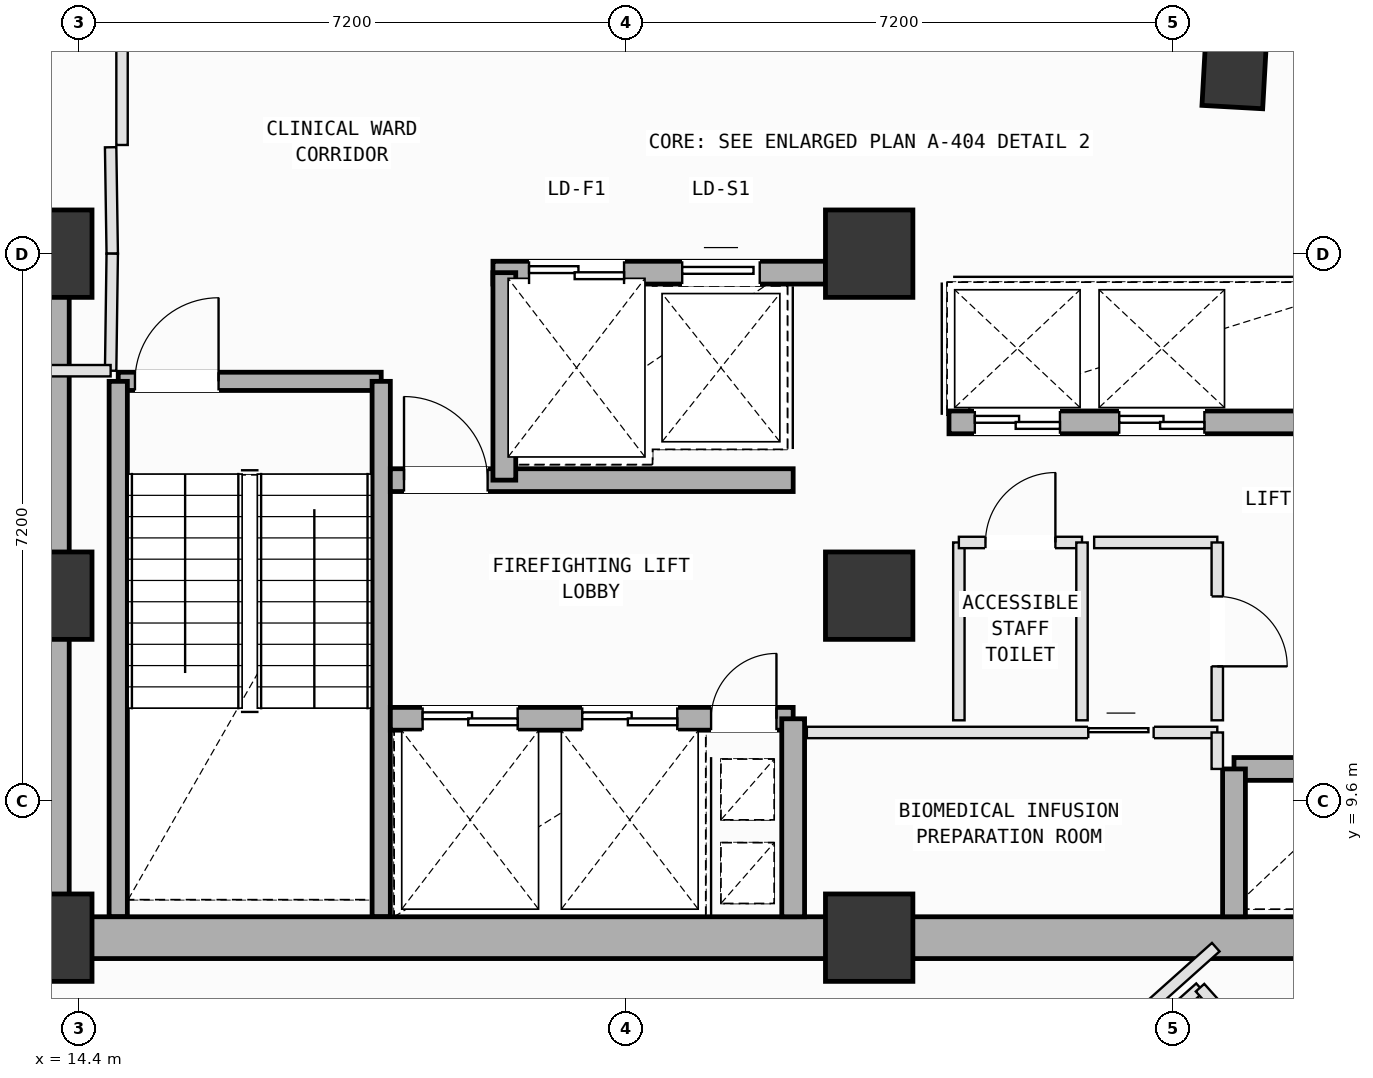
"""IFC4 building model, lengths in metres.
Left out: names, types, materials, properties, quantities, classifications, styles, units other than length and angle.
Written with IfcOpenShell. Run it as: python <this file> out.ifc"""

import sys

from ifc_helpers import new_model, si_unit, direction, frame, frame_2d, origin, origin_2d, place, context, subcontext, project, spatial, rectangle, extrude, element, fill, save


model = new_model("IFC4")
c1 = context("Model", 3, precision=1e-05, world=origin(), true_north=direction((0.0, 1.0)))
c2 = subcontext(c1, "Body", "Model", "MODEL_VIEW")
j1 = project(units=[si_unit("LENGTHUNIT", "METRE"), si_unit("PLANEANGLEUNIT", "RADIAN")], contexts=[c1])
p1 = place(None, origin())
s1 = spatial("IfcSite", under=j1, at=p1, CompositionType="ELEMENT")
p2 = place(p1, origin())
s2 = spatial("IfcBuilding", under=s1, at=p2, CompositionType="ELEMENT")
p3 = place(p2, frame((0.0, 0.0, 201.8)))
s3 = spatial("IfcBuildingStorey", under=s2, at=p3, CompositionType="ELEMENT", Elevation=201.8)
for number, where, z_axis, x_axis in (
    (1, (14.0, 7.8, 0.0), (0.0, 0.0, 1.0), (1.0, 0.0, 0.0)),
    (2, (14.0, 12.3, 0.0), (0.0, 0.0, 1.0), (1.0, 0.0, 0.0)),
    (3, (14.0, 16.8, 0.0), (0.0, 0.0, 1.0), (1.0, 0.0, 0.0)),
    (4, (24.8, 7.8, 0.0), (0.0, 0.0, 1.0), (1.0, 0.0, 0.0)),
    (5, (24.8, 12.3, 0.0), (0.0, 0.0, 1.0), (1.0, 0.0, 0.0)),
    (6, (24.8, 16.8, 0.0), (0.0, 0.0, 1.0), (1.0, 0.0, 0.0)),
):
    element("IfcColumn", number, at=place(p3, frame(where, z_axis=z_axis, x_axis=x_axis)), inside=s3, PredefinedType="COLUMN", context=c2, shape_type="SweptSolid", body=[
        extrude(rectangle(XDim=1.15, YDim=1.15, at=origin_2d()), origin(), (0.0, 0.0, 1.0), 4.0),
    ])
p4 = place(p3, frame((29.617, 19.428, 0.002), z_axis=(0.022404649065, -0.016327771648, 0.999615643922), x_axis=(-0.773714259991, 0.632929754663, 0.027679767862)))
e7 = element("IfcColumn", 7, at=p4, inside=s3, PredefinedType="COLUMN", context=c2, shape_type="SweptSolid", body=[
    extrude(rectangle(XDim=1.4, YDim=0.8, at=origin_2d()), origin(), (0.0, 0.0, 1.0), 3.977),
])
p5 = place(p3, frame((17.225, 1.931, 0.0), z_axis=(0.0, 0.0, 1.0), x_axis=(-0.666514603802, 0.745491973746, 0.0)))
e8 = element("IfcWall", 8, at=p5, inside=s3, PredefinedType="SOLIDWALL", context=c2, shape_type="SweptSolid", body=[
    extrude(rectangle(XDim=7.36, YDim=0.28, at=frame_2d((3.68, 0.0))), origin(), (0.0, 0.0, 1.0), 3.185),
])
p6 = place(p5, frame((2.881, 0.0, 0.75)))
e9 = element("IfcOpeningElement", 9, at=p6, cuts=e8, PredefinedType="OPENING", context=c2, shape_type="SweptSolid", body=[
    extrude(rectangle(XDim=1.6, YDim=1.95, at=frame_2d((0.8, 0.975))), frame((0.0, 0.15, 0.0), z_axis=(0.0, -1.0, 0.0), x_axis=(1.0, 0.0, 0.0)), (0.0, 0.0, 1.0), 0.3),
])
p7 = place(p5, frame((5.186, 0.0, 0.75)))
e10 = element("IfcOpeningElement", 10, at=p7, cuts=e8, PredefinedType="OPENING", context=c2, shape_type="SweptSolid", body=[
    extrude(rectangle(XDim=1.6, YDim=1.95, at=frame_2d((0.8, 0.975))), frame((0.0, 0.15, 0.0), z_axis=(0.0, -1.0, 0.0), x_axis=(1.0, 0.0, 0.0)), (0.0, 0.0, 1.0), 0.3),
])
p8 = place(p3, frame((14.92, 15.12, 0.0), z_axis=(0.0, 0.0, 1.0), x_axis=(1.0, 0.0, 0.0)))
e11 = element("IfcWall", 11, at=p8, inside=s3, PredefinedType="SOLIDWALL", context=c2, shape_type="SweptSolid", body=[
    extrude(rectangle(XDim=3.46, YDim=0.24, at=frame_2d((1.73, 0.0))), origin(), (0.0, 0.0, 1.0), 3.7),
])
p9 = place(p8, frame((0.22, 0.0, 0.0)))
e12 = element("IfcOpeningElement", 12, at=p9, cuts=e11, PredefinedType="OPENING", context=c2, shape_type="SweptSolid", body=[
    extrude(rectangle(XDim=1.1, YDim=2.15, at=frame_2d((0.55, 1.075))), frame((0.0, 0.13, 0.0), z_axis=(0.0, -1.0, 0.0), x_axis=(1.0, 0.0, 0.0)), (0.0, 0.0, 1.0), 0.26),
])
for number, where, z_axis, x_axis in (
    (13, (18.38, 15.12, 0.0), (0.0, 0.0, 1.0), (0.0, -1.0, 0.0)),
    (14, (14.92, 8.075, 0.0), (0.0, 0.0, 1.0), (0.0, 1.0, 0.0)),
):
    element("IfcWall", number, at=place(p3, frame(where, z_axis=z_axis, x_axis=x_axis)), inside=s3, PredefinedType="SOLIDWALL", context=c2, shape_type="SweptSolid", body=[
        extrude(rectangle(XDim=7.045, YDim=0.24, at=frame_2d((3.522, 0.0))), origin(), (0.0, 0.0, 1.0), 3.7),
    ])
for number, where, z_axis, x_axis in (
    (15, (14.0, 7.8, 0.0), (0.0, 0.0, 1.0), (1.0, 0.0, 0.0)),
    (16, (24.8, 7.8, 0.0), (0.0, 0.0, 1.0), (1.0, 0.0, 0.0)),
):
    element("IfcWall", number, at=place(p3, frame(where, z_axis=z_axis, x_axis=x_axis)), inside=s3, PredefinedType="SHEAR", context=c2, shape_type="SweptSolid", body=[
        extrude(rectangle(XDim=10.8, YDim=0.55, at=frame_2d((5.4, 0.0))), origin(), (0.0, 0.0, 1.0), 3.7),
    ])
p10 = place(p3, frame((14.0, 16.8, 0.0), z_axis=(0.0, 0.0, 1.0), x_axis=(0.0, -1.0, 0.0)))
e17 = element("IfcWall", 17, at=p10, inside=s3, PredefinedType="SHEAR", context=c2, shape_type="SweptSolid", body=[
    extrude(rectangle(XDim=9.0, YDim=0.55, at=frame_2d((4.5, 0.0))), origin(), (0.0, 0.0, 1.0), 3.7),
])
p11 = place(p3, frame((19.85, 16.55, 0.0), z_axis=(0.0, 0.0, 1.0), x_axis=(1.0, 0.0, 0.0)))
e18 = element("IfcWall", 18, at=p11, inside=s3, PredefinedType="SOLIDWALL", context=c2, shape_type="SweptSolid", body=[
    extrude(rectangle(XDim=4.375, YDim=0.3, at=frame_2d((2.188, 0.0))), origin(), (0.0, 0.0, 1.0), 3.7),
])
p12 = place(p11, frame((0.475, 0.0, 0.0)))
e19 = element("IfcOpeningElement", 19, at=p12, cuts=e18, PredefinedType="OPENING", context=c2, shape_type="SweptSolid", body=[
    extrude(rectangle(XDim=1.25, YDim=2.18, at=frame_2d((0.625, 1.09))), frame((0.0, 0.16, 0.0), z_axis=(0.0, -1.0, 0.0), x_axis=(1.0, 0.0, 0.0)), (0.0, 0.0, 1.0), 0.32),
])
p13 = place(p11, frame((2.49, 0.0, 0.0)))
e20 = element("IfcOpeningElement", 20, at=p13, cuts=e18, PredefinedType="OPENING", context=c2, shape_type="SweptSolid", body=[
    extrude(rectangle(XDim=1.02, YDim=2.12, at=frame_2d((0.51, 1.06))), frame((0.0, 0.16, 0.0), z_axis=(0.0, -1.0, 0.0), x_axis=(1.0, 0.0, 0.0)), (0.0, 0.0, 1.0), 0.32),
])
p14 = place(p3, frame((18.5, 10.68, 0.0), z_axis=(0.0, 0.0, 1.0), x_axis=(1.0, 0.0, 0.0)))
e21 = element("IfcWall", 21, at=p14, inside=s3, PredefinedType="SOLIDWALL", context=c2, shape_type="SweptSolid", body=[
    extrude(rectangle(XDim=5.3, YDim=0.3, at=frame_2d((2.65, 0.0))), origin(), (0.0, 0.0, 1.0), 3.7),
])
p15 = place(p14, frame((4.22, 0.0, 0.0)))
e22 = element("IfcOpeningElement", 22, at=p15, cuts=e21, PredefinedType="OPENING", context=c2, shape_type="SweptSolid", body=[
    extrude(rectangle(XDim=0.86, YDim=2.06, at=frame_2d((0.43, 1.03))), frame((0.0, 0.16, 0.0), z_axis=(0.0, -1.0, 0.0), x_axis=(1.0, 0.0, 0.0)), (0.0, 0.0, 1.0), 0.32),
])
p16 = place(p14, frame((0.425, 0.0, 0.0)))
e23 = element("IfcOpeningElement", 23, at=p16, cuts=e21, PredefinedType="OPENING", context=c2, shape_type="SweptSolid", body=[
    extrude(rectangle(XDim=1.25, YDim=2.18, at=frame_2d((0.625, 1.09))), frame((0.0, 0.16, 0.0), z_axis=(0.0, -1.0, 0.0), x_axis=(1.0, 0.0, 0.0)), (0.0, 0.0, 1.0), 0.32),
])
p17 = place(p14, frame((2.525, 0.0, 0.0)))
e24 = element("IfcOpeningElement", 24, at=p17, cuts=e21, PredefinedType="OPENING", context=c2, shape_type="SweptSolid", body=[
    extrude(rectangle(XDim=1.25, YDim=2.18, at=frame_2d((0.625, 1.09))), frame((0.0, 0.16, 0.0), z_axis=(0.0, -1.0, 0.0), x_axis=(1.0, 0.0, 0.0)), (0.0, 0.0, 1.0), 0.32),
])
p18 = place(p3, frame((18.5, 13.82, 0.0), z_axis=(0.0, 0.0, 1.0), x_axis=(1.0, 0.0, 0.0)))
e25 = element("IfcWall", 25, at=p18, inside=s3, PredefinedType="SOLIDWALL", context=c2, shape_type="SweptSolid", body=[
    extrude(rectangle(XDim=5.3, YDim=0.3, at=frame_2d((2.65, 0.0))), origin(), (0.0, 0.0, 1.0), 3.7),
])
p19 = place(p18, frame((0.18, 0.0, 0.0)))
e26 = element("IfcOpeningElement", 26, at=p19, cuts=e25, PredefinedType="OPENING", context=c2, shape_type="SweptSolid", body=[
    extrude(rectangle(XDim=1.1, YDim=2.15, at=frame_2d((0.55, 1.075))), frame((0.0, 0.16, 0.0), z_axis=(0.0, -1.0, 0.0), x_axis=(1.0, 0.0, 0.0)), (0.0, 0.0, 1.0), 0.32),
])
p20 = place(p3, frame((23.8, 8.075, 0.0), z_axis=(0.0, 0.0, 1.0), x_axis=(0.0, 1.0, 0.0)))
e27 = element("IfcWall", 27, at=p20, inside=s3, PredefinedType="SOLIDWALL", context=c2, shape_type="SweptSolid", body=[
    extrude(rectangle(XDim=2.605, YDim=0.3, at=frame_2d((1.302, 0.0))), origin(), (0.0, 0.0, 1.0), 3.7),
])
p21 = place(p3, frame((20.0, 13.82, 0.0), z_axis=(0.0, 0.0, 1.0), x_axis=(0.0, 1.0, 0.0)))
e28 = element("IfcWall", 28, at=p21, inside=s3, PredefinedType="SOLIDWALL", context=c2, shape_type="SweptSolid", body=[
    extrude(rectangle(XDim=2.73, YDim=0.3, at=frame_2d((1.365, 0.0))), origin(), (0.0, 0.0, 1.0), 3.7),
])
p22 = place(p3, frame((29.6, 10.02, 0.0), z_axis=(0.0, 0.0, 1.0), x_axis=(1.0, 0.0, 0.0)))
e29 = element("IfcWall", 29, at=p22, inside=s3, PredefinedType="SOLIDWALL", context=c2, shape_type="SweptSolid", body=[
    extrude(rectangle(XDim=1.7, YDim=0.3, at=frame_2d((0.85, 0.0))), origin(), (0.0, 0.0, 1.0), 3.7),
])
p23 = place(p3, frame((29.6, 8.075, 0.0), z_axis=(0.0, 0.0, 1.0), x_axis=(0.0, 1.0, 0.0)))
e30 = element("IfcWall", 30, at=p23, inside=s3, PredefinedType="SOLIDWALL", context=c2, shape_type="SweptSolid", body=[
    extrude(rectangle(XDim=1.945, YDim=0.3, at=frame_2d((0.973, 0.0))), origin(), (0.0, 0.0, 1.0), 3.7),
])
p24 = place(p3, frame((25.85, 14.58, 0.0), z_axis=(0.0, 0.0, 1.0), x_axis=(1.0, 0.0, 0.0)))
e31 = element("IfcWall", 31, at=p24, inside=s3, PredefinedType="SOLIDWALL", context=c2, shape_type="SweptSolid", body=[
    extrude(rectangle(XDim=5.45, YDim=0.3, at=frame_2d((2.725, 0.0))), origin(), (0.0, 0.0, 1.0), 3.7),
])
p25 = place(p24, frame((0.34, 0.0, 0.0)))
e32 = element("IfcOpeningElement", 32, at=p25, cuts=e31, PredefinedType="OPENING", context=c2, shape_type="SweptSolid", body=[
    extrude(rectangle(XDim=1.12, YDim=2.15, at=frame_2d((0.56, 1.075))), frame((0.0, 0.16, 0.0), z_axis=(0.0, -1.0, 0.0), x_axis=(1.0, 0.0, 0.0)), (0.0, 0.0, 1.0), 0.32),
])
p26 = place(p24, frame((2.24, 0.0, 0.0)))
e33 = element("IfcOpeningElement", 33, at=p26, cuts=e31, PredefinedType="OPENING", context=c2, shape_type="SweptSolid", body=[
    extrude(rectangle(XDim=1.12, YDim=2.15, at=frame_2d((0.56, 1.075))), frame((0.0, 0.16, 0.0), z_axis=(0.0, -1.0, 0.0), x_axis=(1.0, 0.0, 0.0)), (0.0, 0.0, 1.0), 0.32),
])
p27 = place(p3, frame((23.98, 10.5, 0.0), z_axis=(0.0, 0.0, 1.0), x_axis=(1.0, 0.0, 0.0)))
e34 = element("IfcWall", 34, at=p27, inside=s3, PredefinedType="PARTITIONING", context=c2, shape_type="SweptSolid", body=[
    extrude(rectangle(XDim=5.4, YDim=0.15, at=frame_2d((2.7, 0.0))), origin(), (0.0, 0.0, 1.0), 3.7),
])
p28 = place(p27, frame((3.703, 0.0, 0.0)))
e35 = element("IfcOpeningElement", 35, at=p28, cuts=e34, PredefinedType="OPENING", context=c2, shape_type="SweptSolid", body=[
    extrude(rectangle(XDim=0.86, YDim=2.06, at=frame_2d((0.43, 1.03))), frame((0.0, 0.085, 0.0), z_axis=(0.0, -1.0, 0.0), x_axis=(1.0, 0.0, 0.0)), (0.0, 0.0, 1.0), 0.17),
])
p29 = place(p3, frame((29.38, 10.5, 0.0), z_axis=(0.0, 0.0, 1.0), x_axis=(0.0, -1.0, 0.0)))
e36 = element("IfcWall", 36, at=p29, inside=s3, PredefinedType="PARTITIONING", context=c2, shape_type="SweptSolid", body=[
    extrude(rectangle(XDim=0.48, YDim=0.15, at=frame_2d((0.24, 0.0))), origin(), (0.0, 0.0, 1.0), 3.7),
])
p30 = place(p3, frame((25.98, 10.66, 0.0), z_axis=(0.0, 0.0, 1.0), x_axis=(0.0, 1.0, 0.0)))
e37 = element("IfcWall", 37, at=p30, inside=s3, PredefinedType="PARTITIONING", context=c2, shape_type="SweptSolid", body=[
    extrude(rectangle(XDim=2.34, YDim=0.15, at=frame_2d((1.17, 0.0))), origin(), (0.0, 0.0, 1.0), 3.7),
])
p31 = place(p3, frame((25.98, 13.0, 0.0), z_axis=(0.0, 0.0, 1.0), x_axis=(1.0, 0.0, 0.0)))
e38 = element("IfcWall", 38, at=p31, inside=s3, PredefinedType="PARTITIONING", context=c2, shape_type="SweptSolid", body=[
    extrude(rectangle(XDim=1.62, YDim=0.15, at=frame_2d((0.81, 0.0))), origin(), (0.0, 0.0, 1.0), 3.7),
])
p32 = place(p31, frame((0.35, 0.0, 0.0)))
e39 = element("IfcOpeningElement", 39, at=p32, cuts=e38, PredefinedType="OPENING", context=c2, shape_type="SweptSolid", body=[
    extrude(rectangle(XDim=0.92, YDim=2.1, at=frame_2d((0.46, 1.05))), frame((0.0, 0.085, 0.0), z_axis=(0.0, -1.0, 0.0), x_axis=(1.0, 0.0, 0.0)), (0.0, 0.0, 1.0), 0.17),
])
p33 = place(p3, frame((27.6, 13.0, 0.0), z_axis=(0.0, 0.0, 1.0), x_axis=(0.0, -1.0, 0.0)))
e40 = element("IfcWall", 40, at=p33, inside=s3, PredefinedType="PARTITIONING", context=c2, shape_type="SweptSolid", body=[
    extrude(rectangle(XDim=2.34, YDim=0.15, at=frame_2d((1.17, 0.0))), origin(), (0.0, 0.0, 1.0), 3.7),
])
p34 = place(p3, frame((27.76, 13.0, 0.0), z_axis=(0.0, 0.0, 1.0), x_axis=(1.0, 0.0, 0.0)))
e41 = element("IfcWall", 41, at=p34, inside=s3, PredefinedType="PARTITIONING", context=c2, shape_type="SweptSolid", body=[
    extrude(rectangle(XDim=1.62, YDim=0.15, at=frame_2d((0.81, 0.0))), origin(), (0.0, 0.0, 1.0), 3.7),
])
p35 = place(p3, frame((29.38, 13.0, 0.0), z_axis=(0.0, 0.0, 1.0), x_axis=(0.0, -1.0, 0.0)))
e42 = element("IfcWall", 42, at=p35, inside=s3, PredefinedType="PARTITIONING", context=c2, shape_type="SweptSolid", body=[
    extrude(rectangle(XDim=2.34, YDim=0.15, at=frame_2d((1.17, 0.0))), origin(), (0.0, 0.0, 1.0), 3.7),
])
p36 = place(p35, frame((0.71, 0.0, 0.0)))
e43 = element("IfcOpeningElement", 43, at=p36, cuts=e42, PredefinedType="OPENING", context=c2, shape_type="SweptSolid", body=[
    extrude(rectangle(XDim=0.92, YDim=2.1, at=frame_2d((0.46, 1.05))), frame((0.0, 0.085, 0.0), z_axis=(0.0, -1.0, 0.0), x_axis=(1.0, 0.0, 0.0)), (0.0, 0.0, 1.0), 0.17),
])
p37 = place(p3, frame((20.028, -1.017, 0.0), z_axis=(0.0, 0.0, 1.0), x_axis=(0.745456187518, 0.666554628287, 0.0)))
e44 = element("IfcWall", 44, at=p37, inside=s3, PredefinedType="PARTITIONING", context=c2, shape_type="SweptSolid", body=[
    extrude(rectangle(XDim=12.241, YDim=0.15, at=frame_2d((6.12, 0.0))), origin(), (0.0, 0.0, 1.0), 3.7),
])
p38 = place(p3, frame((29.153, 7.142, 0.0), z_axis=(0.0, 0.0, 1.0), x_axis=(0.666482690368, -0.745520505043, 0.0)))
e45 = element("IfcWall", 45, at=p38, inside=s3, PredefinedType="PARTITIONING", context=c2, shape_type="SweptSolid", body=[
    extrude(rectangle(XDim=11.936, YDim=0.15, at=frame_2d((5.968, 0.0))), origin(), (0.0, 0.0, 1.0), 3.7),
])
p39 = place(p38, frame((5.538, 0.0, 0.0)))
e46 = element("IfcOpeningElement", 46, at=p39, cuts=e45, PredefinedType="OPENING", context=c2, shape_type="SweptSolid", body=[
    extrude(rectangle(XDim=0.86, YDim=2.06, at=frame_2d((0.43, 1.03))), frame((0.0, 0.085, 0.0), z_axis=(0.0, -1.0, 0.0), x_axis=(1.0, 0.0, 0.0)), (0.0, 0.0, 1.0), 0.17),
])
p40 = place(p3, frame((29.36, 7.675, 0.0), z_axis=(0.0, 0.0, 1.0), x_axis=(-0.745466954055, -0.666542587095, 0.0)))
e47 = element("IfcWall", 47, at=p40, inside=s3, PredefinedType="PARTITIONING", context=c2, shape_type="SweptSolid", body=[
    extrude(rectangle(XDim=12.76, YDim=0.15, at=frame_2d((6.38, 0.0))), origin(), (0.0, 0.0, 1.0), 3.7),
])
p41 = place(p3, frame((14.97, 20.55, 0.0), z_axis=(0.0, 0.0, 1.0), x_axis=(0.0, -1.0, 0.0)))
e48 = element("IfcWall", 48, at=p41, inside=s3, PredefinedType="PARTITIONING", context=c2, shape_type="SweptSolid", body=[
    extrude(rectangle(XDim=2.32, YDim=0.15, at=frame_2d((1.16, 0.0))), origin(), (0.0, 0.0, 1.0), 3.7),
])
p42 = place(p3, frame((14.82, 18.2, 0.0), z_axis=(0.0, 0.0, 1.0), x_axis=(0.01499656939, -0.99988754513, 0.0)))
e49 = element("IfcWall", 49, at=p42, inside=s3, PredefinedType="PARTITIONING", context=c2, shape_type="SweptSolid", body=[
    extrude(rectangle(XDim=1.4, YDim=0.15, at=frame_2d((0.7, 0.0))), origin(), (0.0, 0.0, 1.0), 3.7),
])
p43 = place(p3, frame((14.841, 16.8, 0.0), z_axis=(0.0, 0.0, 1.0), x_axis=(-0.01363221443, -0.999907077048, 0.0)))
e50 = element("IfcWall", 50, at=p43, inside=s3, PredefinedType="PARTITIONING", context=c2, shape_type="SweptSolid", body=[
    extrude(rectangle(XDim=1.54, YDim=0.15, at=frame_2d((0.77, 0.0))), origin(), (0.0, 0.0, 1.0), 3.7),
])
p44 = place(p3, frame((14.82, 15.26, 0.0), z_axis=(0.0, 0.0, 1.0), x_axis=(-1.0, 0.0, 0.0)))
e51 = element("IfcWall", 51, at=p44, inside=s3, PredefinedType="PARTITIONING", context=c2, shape_type="SweptSolid", body=[
    extrude(rectangle(XDim=1.12, YDim=0.15, at=frame_2d((0.56, 0.0))), origin(), (0.0, 0.0, 1.0), 3.7),
])
p45 = place(p9, origin())
e52 = element("IfcDoor", 52, at=p45, inside=s3, OperationType="SINGLE_SWING_RIGHT", PredefinedType="DOOR", context=c2, shape_type="SweptSolid", body=[
    extrude(rectangle(XDim=1.1, YDim=2.15, at=frame_2d((0.55, 1.075))), frame((0.0, 0.025, 0.0), z_axis=(0.0, -1.0, 0.0), x_axis=(1.0, 0.0, 0.0)), (0.0, 0.0, 1.0), 0.05),
])
fill(e12, e52)
p46 = place(p15, origin())
e53 = element("IfcDoor", 53, at=p46, inside=s3, OperationType="SINGLE_SWING_RIGHT", PredefinedType="DOOR", context=c2, shape_type="SweptSolid", body=[
    extrude(rectangle(XDim=0.86, YDim=2.06, at=frame_2d((0.43, 1.03))), frame((0.0, 0.025, 0.0), z_axis=(0.0, -1.0, 0.0), x_axis=(1.0, 0.0, 0.0)), (0.0, 0.0, 1.0), 0.05),
])
fill(e22, e53)
p47 = place(p19, origin())
e54 = element("IfcDoor", 54, at=p47, inside=s3, OperationType="SINGLE_SWING_LEFT", PredefinedType="DOOR", context=c2, shape_type="SweptSolid", body=[
    extrude(rectangle(XDim=1.1, YDim=2.15, at=frame_2d((0.55, 1.075))), frame((0.0, 0.025, 0.0), z_axis=(0.0, -1.0, 0.0), x_axis=(1.0, 0.0, 0.0)), (0.0, 0.0, 1.0), 0.05),
])
fill(e26, e54)
p48 = place(p16, origin())
e55 = element("IfcDoor", 55, at=p48, inside=s3, OperationType="DOUBLE_DOOR_SLIDING", PredefinedType="DOOR", context=c2, shape_type="SweptSolid", body=[
    extrude(rectangle(XDim=1.25, YDim=2.18, at=frame_2d((0.625, 1.09))), frame((0.0, 0.025, 0.0), z_axis=(0.0, -1.0, 0.0), x_axis=(1.0, 0.0, 0.0)), (0.0, 0.0, 1.0), 0.05),
])
fill(e23, e55)
p49 = place(p17, origin())
e56 = element("IfcDoor", 56, at=p49, inside=s3, OperationType="DOUBLE_DOOR_SLIDING", PredefinedType="DOOR", context=c2, shape_type="SweptSolid", body=[
    extrude(rectangle(XDim=1.25, YDim=2.18, at=frame_2d((0.625, 1.09))), frame((0.0, 0.025, 0.0), z_axis=(0.0, -1.0, 0.0), x_axis=(1.0, 0.0, 0.0)), (0.0, 0.0, 1.0), 0.05),
])
fill(e24, e56)
p50 = place(p25, origin())
e57 = element("IfcDoor", 57, at=p50, inside=s3, OperationType="DOUBLE_DOOR_SLIDING", PredefinedType="DOOR", context=c2, shape_type="SweptSolid", body=[
    extrude(rectangle(XDim=1.12, YDim=2.15, at=frame_2d((0.56, 1.075))), frame((0.0, 0.025, 0.0), z_axis=(0.0, -1.0, 0.0), x_axis=(1.0, 0.0, 0.0)), (0.0, 0.0, 1.0), 0.05),
])
fill(e32, e57)
p51 = place(p26, origin())
e58 = element("IfcDoor", 58, at=p51, inside=s3, OperationType="DOUBLE_DOOR_SLIDING", PredefinedType="DOOR", context=c2, shape_type="SweptSolid", body=[
    extrude(rectangle(XDim=1.12, YDim=2.15, at=frame_2d((0.56, 1.075))), frame((0.0, 0.025, 0.0), z_axis=(0.0, -1.0, 0.0), x_axis=(1.0, 0.0, 0.0)), (0.0, 0.0, 1.0), 0.05),
])
fill(e33, e58)
p52 = place(p12, origin())
e59 = element("IfcDoor", 59, at=p52, inside=s3, OperationType="DOUBLE_DOOR_SLIDING", PredefinedType="DOOR", context=c2, shape_type="SweptSolid", body=[
    extrude(rectangle(XDim=1.25, YDim=2.18, at=frame_2d((0.625, 1.09))), frame((0.0, 0.025, 0.0), z_axis=(0.0, -1.0, 0.0), x_axis=(1.0, 0.0, 0.0)), (0.0, 0.0, 1.0), 0.05),
])
fill(e19, e59)
p53 = place(p13, origin())
e60 = element("IfcDoor", 60, at=p53, inside=s3, OperationType="SLIDING_TO_LEFT", PredefinedType="DOOR", context=c2, shape_type="SweptSolid", body=[
    extrude(rectangle(XDim=1.02, YDim=2.12, at=frame_2d((0.51, 1.06))), frame((0.0, 0.025, 0.0), z_axis=(0.0, -1.0, 0.0), x_axis=(1.0, 0.0, 0.0)), (0.0, 0.0, 1.0), 0.05),
])
fill(e20, e60)
p54 = place(p32, origin())
e61 = element("IfcDoor", 61, at=p54, inside=s3, OperationType="SINGLE_SWING_RIGHT", PredefinedType="DOOR", context=c2, shape_type="SweptSolid", body=[
    extrude(rectangle(XDim=0.92, YDim=2.1, at=frame_2d((0.46, 1.05))), frame((0.0, 0.025, 0.0), z_axis=(0.0, -1.0, 0.0), x_axis=(1.0, 0.0, 0.0)), (0.0, 0.0, 1.0), 0.05),
])
fill(e39, e61)
p55 = place(p36, origin())
e62 = element("IfcDoor", 62, at=p55, inside=s3, OperationType="SINGLE_SWING_RIGHT", PredefinedType="DOOR", context=c2, shape_type="SweptSolid", body=[
    extrude(rectangle(XDim=0.92, YDim=2.1, at=frame_2d((0.46, 1.05))), frame((0.0, 0.025, 0.0), z_axis=(0.0, -1.0, 0.0), x_axis=(1.0, 0.0, 0.0)), (0.0, 0.0, 1.0), 0.05),
])
fill(e43, e62)
p56 = place(p28, origin())
e63 = element("IfcDoor", 63, at=p56, inside=s3, OperationType="SLIDING_TO_LEFT", PredefinedType="DOOR", context=c2, shape_type="SweptSolid", body=[
    extrude(rectangle(XDim=0.86, YDim=2.06, at=frame_2d((0.43, 1.03))), frame((0.0, 0.025, 0.0), z_axis=(0.0, -1.0, 0.0), x_axis=(1.0, 0.0, 0.0)), (0.0, 0.0, 1.0), 0.05),
])
fill(e35, e63)
save(model, sys.argv[1])
